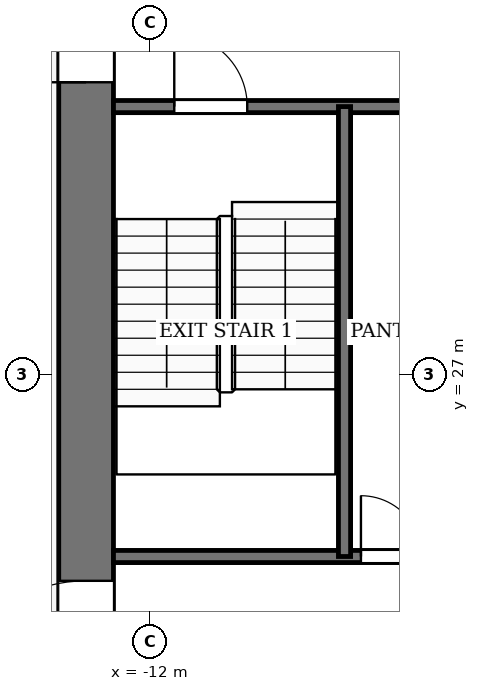
"""IFC4 building model, lengths in metres.
Left out: names, types, materials, properties, quantities, classifications, styles, units other than length and angle.
Written with IfcOpenShell. Run it as: python <this file> out.ifc"""

import sys

from ifc_helpers import new_model, si_unit, direction, frame, frame_2d, origin, place, context, subcontext, project, spatial, rectangle, extrude, element, fill, save


model = new_model("IFC4")
c1 = context("Model", 3, precision=1e-05, world=origin(), true_north=direction((0.0, 1.0)))
c2 = subcontext(c1, "Body", "Model", "MODEL_VIEW")
j1 = project(units=[si_unit("LENGTHUNIT", "METRE"), si_unit("PLANEANGLEUNIT", "RADIAN")], contexts=[c1])
p1 = place(None, origin())
s1 = spatial("IfcSite", under=j1, at=p1, CompositionType="ELEMENT")
p2 = place(p1, origin())
s2 = spatial("IfcBuilding", under=s1, at=p2, CompositionType="ELEMENT")
p3 = place(p2, frame((0.0, 0.0, 190.0)))
s3 = spatial("IfcBuildingStorey", under=s2, at=p3, CompositionType="ELEMENT", Elevation=190.0)
p4 = place(p3, frame((-13.05, 18.4, -0.13), z_axis=(0.0, 0.0, 1.0), x_axis=(0.0, 1.0, 0.0)))
e1 = element("IfcWall", 1, at=p4, inside=s3, PredefinedType="SHEAR", context=c2, shape_type="SweptSolid", body=[
    extrude(rectangle(XDim=19.2, YDim=0.9, at=frame_2d((9.6, 0.0))), origin(), (0.0, 0.0, 1.0), 4.0),
])
p5 = place(p4, frame((2.8, 0.0, 0.13)))
e2 = element("IfcOpeningElement", 2, at=p5, cuts=e1, PredefinedType="OPENING", context=c2, shape_type="SweptSolid", body=[
    extrude(rectangle(XDim=2.4, YDim=2.4, at=frame_2d((1.2, 1.2))), frame((0.0, 0.46, 0.0), z_axis=(0.0, -1.0, 0.0), x_axis=(1.0, 0.0, 0.0)), (0.0, 0.0, 1.0), 0.92),
])
p6 = place(p4, frame((13.4, 0.0, 0.13)))
e3 = element("IfcOpeningElement", 3, at=p6, cuts=e1, PredefinedType="OPENING", context=c2, shape_type="SweptSolid", body=[
    extrude(rectangle(XDim=1.4, YDim=2.2, at=frame_2d((0.7, 1.1))), frame((0.0, 0.46, 0.0), z_axis=(0.0, -1.0, 0.0), x_axis=(1.0, 0.0, 0.0)), (0.0, 0.0, 1.0), 0.92),
])
p7 = place(p3, frame((-12.6, 24.0, 0.0), z_axis=(0.0, 0.0, 1.0), x_axis=(1.0, 0.0, 0.0)))
e4 = element("IfcWall", 4, at=p7, inside=s3, PredefinedType="PARTITIONING", context=c2, shape_type="SweptSolid", body=[
    extrude(rectangle(XDim=6.6, YDim=0.2, at=frame_2d((3.3, 0.0))), origin(), (0.0, 0.0, 1.0), 3.87),
])
p8 = place(p7, frame((4.07, 0.0, 0.0)))
e5 = element("IfcOpeningElement", 5, at=p8, cuts=e4, PredefinedType="OPENING", context=c2, shape_type="SweptSolid", body=[
    extrude(rectangle(XDim=1.0, YDim=2.1, at=frame_2d((0.5, 1.05))), frame((0.0, 0.11, 0.0), z_axis=(0.0, -1.0, 0.0), x_axis=(1.0, 0.0, 0.0)), (0.0, 0.0, 1.0), 0.22),
])
p9 = place(p7, frame((5.57, 0.0, 0.0)))
e6 = element("IfcOpeningElement", 6, at=p9, cuts=e4, PredefinedType="OPENING", context=c2, shape_type="SweptSolid", body=[
    extrude(rectangle(XDim=0.8, YDim=2.1, at=frame_2d((0.4, 1.05))), frame((0.0, 0.11, 0.0), z_axis=(0.0, -1.0, 0.0), x_axis=(1.0, 0.0, 0.0)), (0.0, 0.0, 1.0), 0.22),
])
p10 = place(p3, frame((-12.6, 31.4, 0.0), z_axis=(0.0, 0.0, 1.0), x_axis=(1.0, 0.0, 0.0)))
e7 = element("IfcWall", 7, at=p10, inside=s3, PredefinedType="PARTITIONING", context=c2, shape_type="SweptSolid", body=[
    extrude(rectangle(XDim=6.6, YDim=0.2, at=frame_2d((3.3, 0.0))), origin(), (0.0, 0.0, 1.0), 3.87),
])
p11 = place(p10, frame((1.0, 0.0, 0.0)))
e8 = element("IfcOpeningElement", 8, at=p11, cuts=e7, PredefinedType="OPENING", context=c2, shape_type="SweptSolid", body=[
    extrude(rectangle(XDim=1.2, YDim=2.2, at=frame_2d((0.6, 1.1))), frame((0.0, 0.11, 0.0), z_axis=(0.0, -1.0, 0.0), x_axis=(1.0, 0.0, 0.0)), (0.0, 0.0, 1.0), 0.22),
])
p12 = place(p3, frame((-8.8, 24.0, 0.0), z_axis=(0.0, 0.0, 1.0), x_axis=(0.0, 1.0, 0.0)))
e9 = element("IfcWall", 9, at=p12, inside=s3, PredefinedType="PARTITIONING", context=c2, shape_type="SweptSolid", body=[
    extrude(rectangle(XDim=7.4, YDim=0.2, at=frame_2d((3.7, 0.0))), origin(), (0.0, 0.0, 1.0), 3.87),
])
p13 = place(p8, origin())
e10 = element("IfcDoor", 10, at=p13, inside=s3, OperationType="SINGLE_SWING_RIGHT", PredefinedType="DOOR", context=c2, shape_type="SweptSolid", body=[
    extrude(rectangle(XDim=1.0, YDim=2.1, at=frame_2d((0.5, 1.05))), frame((0.0, 0.025, 0.0), z_axis=(0.0, -1.0, 0.0), x_axis=(1.0, 0.0, 0.0)), (0.0, 0.0, 1.0), 0.05),
])
fill(e5, e10)
p14 = place(p11, origin())
e11 = element("IfcDoor", 11, at=p14, inside=s3, OperationType="SINGLE_SWING_RIGHT", PredefinedType="DOOR", context=c2, shape_type="SweptSolid", body=[
    extrude(rectangle(XDim=1.2, YDim=2.2, at=frame_2d((0.6, 1.1))), frame((0.0, 0.025, 0.0), z_axis=(0.0, -1.0, 0.0), x_axis=(1.0, 0.0, 0.0)), (0.0, 0.0, 1.0), 0.05),
])
fill(e8, e11)
p15 = place(p5, origin())
e12 = element("IfcDoor", 12, at=p15, inside=s3, OperationType="DOUBLE_DOOR_SINGLE_SWING", PredefinedType="DOOR", context=c2, shape_type="SweptSolid", body=[
    extrude(rectangle(XDim=2.4, YDim=2.4, at=frame_2d((1.2, 1.2))), frame((0.0, 0.025, 0.0), z_axis=(0.0, -1.0, 0.0), x_axis=(1.0, 0.0, 0.0)), (0.0, 0.0, 1.0), 0.05),
])
fill(e2, e12)
p16 = place(p6, origin())
e13 = element("IfcDoor", 13, at=p16, inside=s3, OperationType="SINGLE_SWING_RIGHT", PredefinedType="DOOR", context=c2, shape_type="SweptSolid", body=[
    extrude(rectangle(XDim=1.4, YDim=2.2, at=frame_2d((0.7, 1.1))), frame((0.0, 0.025, 0.0), z_axis=(0.0, -1.0, 0.0), x_axis=(1.0, 0.0, 0.0)), (0.0, 0.0, 1.0), 0.05),
])
fill(e3, e13)
save(model, sys.argv[1])
